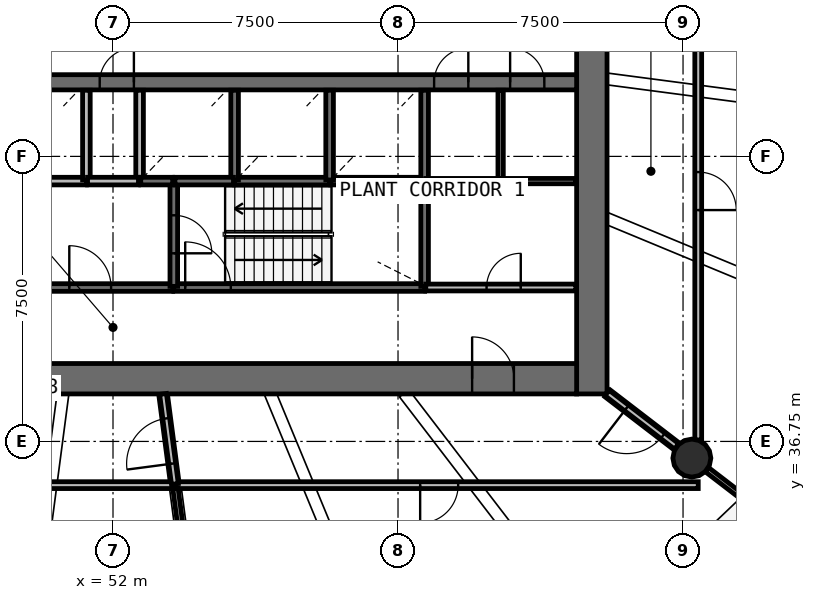
"""IFC4 building model, lengths in metres.
Left out: names, types, materials, properties, quantities, classifications, styles, units other than length and angle.
Written with IfcOpenShell. Run it as: python <this file> out.ifc"""

import sys

from ifc_helpers import new_model, si_unit, direction, frame, frame_2d, origin, origin_2d, place, context, subcontext, project, spatial, rectangle, circle, extrude, source, transform, mapped, element, fill, save


model = new_model("IFC4")
c1 = context("Model", 3, precision=1e-05, world=origin(), true_north=direction((0.0, 1.0)))
c2 = subcontext(c1, "Body", "Model", "MODEL_VIEW")
j1 = project(units=[si_unit("LENGTHUNIT", "METRE"), si_unit("PLANEANGLEUNIT", "RADIAN")], contexts=[c1])
p1 = place(None, origin())
s1 = spatial("IfcSite", under=j1, at=p1, CompositionType="ELEMENT")
p2 = place(p1, origin())
s2 = spatial("IfcBuilding", under=s1, at=p2, CompositionType="ELEMENT")
p3 = place(p2, frame((0.0, 0.0, 129.0)))
s3 = spatial("IfcBuildingStorey", under=s2, at=p3, CompositionType="ELEMENT", Elevation=129.0)
p4 = place(p3, frame((64.6, 38.0, 0.0), z_axis=(0.0, 0.0, 1.0), x_axis=(0.0, 1.0, 0.0)))
e1 = element("IfcWall", 1, at=p4, inside=s3, PredefinedType="SHEAR", context=c2, shape_type="SweptSolid", body=[
    extrude(rectangle(XDim=20.0, YDim=0.8, at=frame_2d((10.0, 0.0))), origin(), (0.0, 0.0, 1.0), 4.1),
])
p5 = place(p4, frame((9.1, 0.0, 0.0)))
e2 = element("IfcOpeningElement", 2, at=p5, cuts=e1, PredefinedType="OPENING", context=c2, shape_type="SweptSolid", body=[
    extrude(rectangle(XDim=1.8, YDim=2.1, at=frame_2d((0.9, 1.05))), frame((0.0, 0.41, 0.0), z_axis=(0.0, -1.0, 0.0), x_axis=(1.0, 0.0, 0.0)), (0.0, 0.0, 1.0), 0.82),
])
p6 = place(p3, frame((39.8, 38.4, 0.0), z_axis=(0.0, 0.0, 1.0), x_axis=(1.0, 0.0, 0.0)))
e3 = element("IfcWall", 3, at=p6, inside=s3, PredefinedType="SHEAR", context=c2, shape_type="SweptSolid", body=[
    extrude(rectangle(XDim=24.4, YDim=0.8, at=frame_2d((12.2, 0.0))), origin(), (0.0, 0.0, 1.0), 4.1),
])
p7 = place(p6, frame((21.65, 0.0, 0.0)))
e4 = element("IfcOpeningElement", 4, at=p7, cuts=e3, PredefinedType="OPENING", context=c2, shape_type="SweptSolid", body=[
    extrude(rectangle(XDim=1.1, YDim=2.1, at=frame_2d((0.55, 1.05))), frame((0.0, 0.41, 0.0), z_axis=(0.0, -1.0, 0.0), x_axis=(1.0, 0.0, 0.0)), (0.0, 0.0, 1.0), 0.82),
])
p8 = place(p6, frame((2.15, 0.0, 0.0)))
e5 = element("IfcOpeningElement", 5, at=p8, cuts=e3, PredefinedType="OPENING", context=c2, shape_type="SweptSolid", body=[
    extrude(rectangle(XDim=1.1, YDim=2.1, at=frame_2d((0.55, 1.05))), frame((0.0, 0.41, 0.0), z_axis=(0.0, -1.0, 0.0), x_axis=(1.0, 0.0, 0.0)), (0.0, 0.0, 1.0), 0.82),
])
p9 = place(p3, frame((39.8, 46.2, 0.0), z_axis=(0.0, 0.0, 1.0), x_axis=(1.0, 0.0, 0.0)))
e6 = element("IfcWall", 6, at=p9, inside=s3, PredefinedType="SHEAR", context=c2, shape_type="SweptSolid", body=[
    extrude(rectangle(XDim=24.4, YDim=0.4, at=frame_2d((12.2, 0.0))), origin(), (0.0, 0.0, 1.0), 4.1),
])
p10 = place(p9, frame((20.65, 0.0, 0.0)))
e7 = element("IfcOpeningElement", 7, at=p10, cuts=e6, PredefinedType="OPENING", context=c2, shape_type="SweptSolid", body=[
    extrude(rectangle(XDim=0.9, YDim=2.1, at=frame_2d((0.45, 1.05))), frame((0.0, 0.21, 0.0), z_axis=(0.0, -1.0, 0.0), x_axis=(1.0, 0.0, 0.0)), (0.0, 0.0, 1.0), 0.42),
])
p11 = place(p9, frame((22.65, 0.0, 0.0)))
e8 = element("IfcOpeningElement", 8, at=p11, cuts=e6, PredefinedType="OPENING", context=c2, shape_type="SweptSolid", body=[
    extrude(rectangle(XDim=0.9, YDim=2.1, at=frame_2d((0.45, 1.05))), frame((0.0, 0.21, 0.0), z_axis=(0.0, -1.0, 0.0), x_axis=(1.0, 0.0, 0.0)), (0.0, 0.0, 1.0), 0.42),
])
p12 = place(p9, frame((0.85, 0.0, 0.0)))
e9 = element("IfcOpeningElement", 9, at=p12, cuts=e6, PredefinedType="OPENING", context=c2, shape_type="SweptSolid", body=[
    extrude(rectangle(XDim=0.9, YDim=2.1, at=frame_2d((0.45, 1.05))), frame((0.0, 0.21, 0.0), z_axis=(0.0, -1.0, 0.0), x_axis=(1.0, 0.0, 0.0)), (0.0, 0.0, 1.0), 0.42),
])
p13 = place(p9, frame((2.85, 0.0, 0.0)))
e10 = element("IfcOpeningElement", 10, at=p13, cuts=e6, PredefinedType="OPENING", context=c2, shape_type="SweptSolid", body=[
    extrude(rectangle(XDim=0.9, YDim=2.1, at=frame_2d((0.45, 1.05))), frame((0.0, 0.21, 0.0), z_axis=(0.0, -1.0, 0.0), x_axis=(1.0, 0.0, 0.0)), (0.0, 0.0, 1.0), 0.42),
])
p14 = place(p9, frame((11.85, 0.0, 0.0)))
e11 = element("IfcOpeningElement", 11, at=p14, cuts=e6, PredefinedType="OPENING", context=c2, shape_type="SweptSolid", body=[
    extrude(rectangle(XDim=0.9, YDim=2.1, at=frame_2d((0.45, 1.05))), frame((0.0, 0.21, 0.0), z_axis=(0.0, -1.0, 0.0), x_axis=(1.0, 0.0, 0.0)), (0.0, 0.0, 1.0), 0.42),
])
m1 = source(origin(), c2, "Body", "SweptSolid", [
    extrude(circle(Radius=0.5, at=origin_2d()), origin(), (0.0, 0.0, 1.0), 3.78),
])
p15 = place(p3, frame((67.232, 36.312, 0.0), z_axis=(0.0, 0.0, 1.0), x_axis=(1.0, 0.0, 0.0)))
e12 = element("IfcColumn", 12, at=p15, inside=s3, PredefinedType="COLUMN", context=c2, shape_type="MappedRepresentation", body=[
    mapped(m1, transform((0.0, 0.0, 0.0), scale=1.0)),
])
p16 = place(p3, frame((53.6, 40.8, 0.0), z_axis=(0.0, 0.0, 1.0), x_axis=(1.0, 0.0, 0.0)))
e13 = element("IfcWall", 13, at=p16, inside=s3, PredefinedType="SOLIDWALL", context=c2, shape_type="SweptSolid", body=[
    extrude(rectangle(XDim=6.6, YDim=0.2, at=frame_2d((3.3, 0.0))), origin(), (0.0, 0.0, 1.0), 3.78),
])
p17 = place(p16, frame((0.3, 0.0, 0.0)))
e14 = element("IfcOpeningElement", 14, at=p17, cuts=e13, PredefinedType="OPENING", context=c2, shape_type="SweptSolid", body=[
    extrude(rectangle(XDim=1.2, YDim=2.1, at=frame_2d((0.6, 1.05))), frame((0.0, 0.11, 0.0), z_axis=(0.0, -1.0, 0.0), x_axis=(1.0, 0.0, 0.0)), (0.0, 0.0, 1.0), 0.22),
])
p18 = place(p3, frame((47.9, 40.8, 0.0), z_axis=(0.0, 0.0, 1.0), x_axis=(1.0, 0.0, 0.0)))
e15 = element("IfcWall", 15, at=p18, inside=s3, PredefinedType="SOLIDWALL", context=c2, shape_type="SweptSolid", body=[
    extrude(rectangle(XDim=5.67, YDim=0.2, at=frame_2d((2.835, 0.0))), origin(), (0.0, 0.0, 1.0), 3.78),
])
p19 = place(p18, frame((2.95, 0.0, 0.0)))
e16 = element("IfcOpeningElement", 16, at=p19, cuts=e15, PredefinedType="OPENING", context=c2, shape_type="SweptSolid", body=[
    extrude(rectangle(XDim=1.1, YDim=2.1, at=frame_2d((0.55, 1.05))), frame((0.0, 0.11, 0.0), z_axis=(0.0, -1.0, 0.0), x_axis=(1.0, 0.0, 0.0)), (0.0, 0.0, 1.0), 0.22),
])
p20 = place(p3, frame((60.2, 40.83, 0.0), z_axis=(0.0, 0.0, 1.0), x_axis=(0.0, 1.0, 0.0)))
e17 = element("IfcWall", 17, at=p20, inside=s3, PredefinedType="SOLIDWALL", context=c2, shape_type="SweptSolid", body=[
    extrude(rectangle(XDim=2.77, YDim=0.2, at=frame_2d((1.385, 0.0))), origin(), (0.0, 0.0, 1.0), 3.78),
])
p21 = place(p3, frame((53.6, 43.6, 0.0), z_axis=(0.0, 0.0, 1.0), x_axis=(0.0, -1.0, 0.0)))
e18 = element("IfcWall", 18, at=p21, inside=s3, PredefinedType="SOLIDWALL", context=c2, shape_type="SweptSolid", body=[
    extrude(rectangle(XDim=2.77, YDim=0.2, at=frame_2d((1.385, 0.0))), origin(), (0.0, 0.0, 1.0), 3.78),
])
p22 = place(p21, frame((0.9, 0.0, 0.0)))
e19 = element("IfcOpeningElement", 19, at=p22, cuts=e18, PredefinedType="OPENING", context=c2, shape_type="SweptSolid", body=[
    extrude(rectangle(XDim=1.0, YDim=2.1, at=frame_2d((0.5, 1.05))), frame((0.0, 0.11, 0.0), z_axis=(0.0, -1.0, 0.0), x_axis=(1.0, 0.0, 0.0)), (0.0, 0.0, 1.0), 0.22),
])
for number, where, z_axis, x_axis in (
    (20, (48.8, 43.6, 0.0), (0.0, 0.0, 1.0), (1.0, 0.0, 0.0)),
    (21, (55.2, 43.6, 0.0), (0.0, 0.0, 1.0), (1.0, 0.0, 0.0)),
):
    element("IfcWall", number, at=place(p3, frame(where, z_axis=z_axis, x_axis=x_axis)), inside=s3, PredefinedType="SOLIDWALL", context=c2, shape_type="SweptSolid", body=[
        extrude(rectangle(XDim=2.5, YDim=0.2, at=frame_2d((1.25, 0.0))), origin(), (0.0, 0.0, 1.0), 3.78),
    ])
p23 = place(p3, frame((57.73, 43.6, 0.0), z_axis=(0.0, 0.0, 1.0), x_axis=(1.0, 0.0, 0.0)))
e22 = element("IfcWall", 22, at=p23, inside=s3, PredefinedType="SOLIDWALL", context=c2, shape_type="SweptSolid", body=[
    extrude(rectangle(XDim=2.44, YDim=0.2, at=frame_2d((1.22, 0.0))), origin(), (0.0, 0.0, 1.0), 3.78),
])
p24 = place(p3, frame((51.3, 43.63, 0.0), z_axis=(0.0, 0.0, 1.0), x_axis=(0.0, 1.0, 0.0)))
e23 = element("IfcWall", 23, at=p24, inside=s3, PredefinedType="SOLIDWALL", context=c2, shape_type="SweptSolid", body=[
    extrude(rectangle(XDim=2.36, YDim=0.2, at=frame_2d((1.18, 0.0))), origin(), (0.0, 0.0, 1.0), 3.78),
])
p25 = place(p3, frame((52.7, 45.99, 0.0), z_axis=(0.0, 0.0, 1.0), x_axis=(0.0, -1.0, 0.0)))
e24 = element("IfcWall", 24, at=p25, inside=s3, PredefinedType="SOLIDWALL", context=c2, shape_type="SweptSolid", body=[
    extrude(rectangle(XDim=2.39, YDim=0.2, at=frame_2d((1.195, 0.0))), origin(), (0.0, 0.0, 1.0), 3.78),
])
for number, where, z_axis, x_axis in (
    (25, (55.2, 43.63, 0.0), (0.0, 0.0, 1.0), (0.0, 1.0, 0.0)),
    (26, (57.7, 43.63, 0.0), (0.0, 0.0, 1.0), (0.0, 1.0, 0.0)),
    (27, (60.2, 43.63, 0.0), (0.0, 0.0, 1.0), (0.0, 1.0, 0.0)),
):
    element("IfcWall", number, at=place(p3, frame(where, z_axis=z_axis, x_axis=x_axis)), inside=s3, PredefinedType="SOLIDWALL", context=c2, shape_type="SweptSolid", body=[
        extrude(rectangle(XDim=2.36, YDim=0.2, at=frame_2d((1.18, 0.0))), origin(), (0.0, 0.0, 1.0), 3.78),
    ])
p26 = place(p3, frame((53.63, 43.6, 0.0), z_axis=(0.0, 0.0, 1.0), x_axis=(1.0, 0.0, 0.0)))
e28 = element("IfcWall", 28, at=p26, inside=s3, PredefinedType="SOLIDWALL", context=c2, shape_type="SweptSolid", body=[
    extrude(rectangle(XDim=1.54, YDim=0.2, at=frame_2d((0.77, 0.0))), origin(), (0.0, 0.0, 1.0), 3.78),
])
p27 = place(p3, frame((52.67, 43.6, 0.0), z_axis=(0.0, 0.0, 1.0), x_axis=(-1.0, 0.0, 0.0)))
e29 = element("IfcWall", 29, at=p27, inside=s3, PredefinedType="SOLIDWALL", context=c2, shape_type="SweptSolid", body=[
    extrude(rectangle(XDim=1.34, YDim=0.2, at=frame_2d((0.67, 0.0))), origin(), (0.0, 0.0, 1.0), 3.78),
])
p28 = place(p3, frame((52.73, 43.6, 0.0), z_axis=(0.0, 0.0, 1.0), x_axis=(1.0, 0.0, 0.0)))
e30 = element("IfcWall", 30, at=p28, inside=s3, PredefinedType="SOLIDWALL", context=c2, shape_type="SweptSolid", body=[
    extrude(rectangle(XDim=0.84, YDim=0.2, at=frame_2d((0.42, 0.0))), origin(), (0.0, 0.0, 1.0), 3.78),
])
p29 = place(p3, frame((67.4, 35.6, 0.0), z_axis=(0.0, 0.0, 1.0), x_axis=(-1.0, 0.0, 0.0)))
e31 = element("IfcWall", 31, at=p29, inside=s3, PredefinedType="PARTITIONING", context=c2, shape_type="SweptSolid", body=[
    extrude(rectangle(XDim=13.767, YDim=0.18, at=frame_2d((6.884, 0.0))), origin(), (0.0, 0.0, 1.0), 2.58),
])
p30 = place(p29, frame((6.317, 0.0, 0.0)))
e32 = element("IfcOpeningElement", 32, at=p30, cuts=e31, PredefinedType="OPENING", context=c2, shape_type="SweptSolid", body=[
    extrude(rectangle(XDim=1.0, YDim=2.1, at=frame_2d((0.5, 1.05))), frame((0.0, 0.1, 0.0), z_axis=(0.0, -1.0, 0.0), x_axis=(1.0, 0.0, 0.0)), (0.0, 0.0, 1.0), 0.2),
])
p31 = place(p3, frame((67.4, 50.027, 0.0), z_axis=(0.0, 0.0, 1.0), x_axis=(0.0, -1.0, 0.0)))
e33 = element("IfcWall", 33, at=p31, inside=s3, PredefinedType="PARTITIONING", context=c2, shape_type="SweptSolid", body=[
    extrude(rectangle(XDim=13.24, YDim=0.18, at=frame_2d((6.62, 0.0))), origin(), (0.0, 0.0, 1.0), 2.58),
])
p32 = place(p31, frame((6.19, 0.0, 0.0)))
e34 = element("IfcOpeningElement", 34, at=p32, cuts=e33, PredefinedType="OPENING", context=c2, shape_type="SweptSolid", body=[
    extrude(rectangle(XDim=1.0, YDim=2.1, at=frame_2d((0.5, 1.05))), frame((0.0, 0.1, 0.0), z_axis=(0.0, -1.0, 0.0), x_axis=(1.0, 0.0, 0.0)), (0.0, 0.0, 1.0), 0.2),
])
p33 = place(p3, frame((53.603, 35.6, 0.0), z_axis=(0.0, 0.0, 1.0), x_axis=(-1.0, 0.0, 0.0)))
e35 = element("IfcWall", 35, at=p33, inside=s3, PredefinedType="PARTITIONING", context=c2, shape_type="SweptSolid", body=[
    extrude(rectangle(XDim=11.117, YDim=0.18, at=frame_2d((5.559, 0.0))), origin(), (0.0, 0.0, 1.0), 2.58),
])
p34 = place(p33, frame((5.067, 0.0, 0.0)))
e36 = element("IfcOpeningElement", 36, at=p34, cuts=e35, PredefinedType="OPENING", context=c2, shape_type="SweptSolid", body=[
    extrude(rectangle(XDim=1.0, YDim=2.1, at=frame_2d((0.5, 1.05))), frame((0.0, 0.1, 0.0), z_axis=(0.0, -1.0, 0.0), x_axis=(1.0, 0.0, 0.0)), (0.0, 0.0, 1.0), 0.2),
])
p35 = place(p3, frame((60.23, 40.8, 0.0), z_axis=(0.0, 0.0, 1.0), x_axis=(1.0, 0.0, 0.0)))
e37 = element("IfcWall", 37, at=p35, inside=s3, PredefinedType="PARTITIONING", context=c2, shape_type="SweptSolid", body=[
    extrude(rectangle(XDim=3.95, YDim=0.18, at=frame_2d((1.975, 0.0))), origin(), (0.0, 0.0, 1.0), 3.78),
])
p36 = place(p35, frame((1.6, 0.0, 0.0)))
e38 = element("IfcOpeningElement", 38, at=p36, cuts=e37, PredefinedType="OPENING", context=c2, shape_type="SweptSolid", body=[
    extrude(rectangle(XDim=0.9, YDim=2.1, at=frame_2d((0.45, 1.05))), frame((0.0, 0.1, 0.0), z_axis=(0.0, -1.0, 0.0), x_axis=(1.0, 0.0, 0.0)), (0.0, 0.0, 1.0), 0.2),
])
p37 = place(p3, frame((53.629, 35.63, 0.0), z_axis=(0.0, 0.0, 1.0), x_axis=(-0.13060507681, 0.991434472828, 0.0)))
e39 = element("IfcWall", 39, at=p37, inside=s3, PredefinedType="PARTITIONING", context=c2, shape_type="SweptSolid", body=[
    extrude(rectangle(XDim=2.391, YDim=0.18, at=frame_2d((1.195, 0.0))), origin(), (0.0, 0.0, 1.0), 2.58),
])
p38 = place(p37, frame((0.541, 0.0, 0.0)))
e40 = element("IfcOpeningElement", 40, at=p38, cuts=e39, PredefinedType="OPENING", context=c2, shape_type="SweptSolid", body=[
    extrude(rectangle(XDim=1.2, YDim=2.1, at=frame_2d((0.6, 1.05))), frame((0.0, 0.1, 0.0), z_axis=(0.0, -1.0, 0.0), x_axis=(1.0, 0.0, 0.0)), (0.0, 0.0, 1.0), 0.2),
])
p39 = place(p3, frame((66.832, 36.619, 0.0), z_axis=(0.0, 0.0, 1.0), x_axis=(-0.793393624489, 0.608708926023, 0.0)))
e41 = element("IfcWall", 41, at=p39, inside=s3, PredefinedType="PARTITIONING", context=c2, shape_type="SweptSolid", body=[
    extrude(rectangle(XDim=2.309, YDim=0.18, at=frame_2d((1.155, 0.0))), origin(), (0.0, 0.0, 1.0), 2.58),
])
p40 = place(p39, frame((0.459, 0.0, 0.0)))
e42 = element("IfcOpeningElement", 42, at=p40, cuts=e41, PredefinedType="OPENING", context=c2, shape_type="SweptSolid", body=[
    extrude(rectangle(XDim=1.2, YDim=2.1, at=frame_2d((0.6, 1.05))), frame((0.0, 0.1, 0.0), z_axis=(0.0, -1.0, 0.0), x_axis=(1.0, 0.0, 0.0)), (0.0, 0.0, 1.0), 0.2),
])
p41 = place(p3, frame((62.2, 43.6, 0.0), z_axis=(0.0, 0.0, 1.0), x_axis=(0.0, 1.0, 0.0)))
e43 = element("IfcWall", 43, at=p41, inside=s3, PredefinedType="PARTITIONING", context=c2, shape_type="SweptSolid", body=[
    extrude(rectangle(XDim=2.39, YDim=0.14, at=frame_2d((1.195, 0.0))), origin(), (0.0, 0.0, 1.0), 2.98),
])
p42 = place(p3, frame((53.644, 35.51, 0.0), z_axis=(0.0, 0.0, 1.0), x_axis=(0.130498135038, -0.991448554768, 0.0)))
e44 = element("IfcWall", 44, at=p42, inside=s3, PredefinedType="PARTITIONING", context=c2, shape_type="SweptSolid", body=[
    extrude(rectangle(XDim=1.882, YDim=0.14, at=frame_2d((0.941, 0.0))), origin(), (0.0, 0.0, 1.0), 2.58),
])
p43 = place(p3, frame((60.23, 43.6, 0.0), z_axis=(0.0, 0.0, 1.0), x_axis=(1.0, 0.0, 0.0)))
e45 = element("IfcWall", 45, at=p43, inside=s3, PredefinedType="PARTITIONING", context=c2, shape_type="SweptSolid", body=[
    extrude(rectangle(XDim=1.94, YDim=0.14, at=frame_2d((0.97, 0.0))), origin(), (0.0, 0.0, 1.0), 2.98),
])
p44 = place(p3, frame((62.23, 43.6, 0.0), z_axis=(0.0, 0.0, 1.0), x_axis=(1.0, 0.0, 0.0)))
e46 = element("IfcWall", 46, at=p44, inside=s3, PredefinedType="PARTITIONING", context=c2, shape_type="SweptSolid", body=[
    extrude(rectangle(XDim=1.95, YDim=0.14, at=frame_2d((0.975, 0.0))), origin(), (0.0, 0.0, 1.0), 2.98),
])
p45 = place(p3, frame((67.633, 36.005, 0.0), z_axis=(0.0, 0.0, 1.0), x_axis=(0.793448671778, -0.60863717045, 0.0)))
e47 = element("IfcWall", 47, at=p45, inside=s3, PredefinedType="PARTITIONING", context=c2, shape_type="SweptSolid", body=[
    extrude(rectangle(XDim=1.122, YDim=0.14, at=frame_2d((0.561, 0.0))), origin(), (0.0, 0.0, 1.0), 2.58),
])
m2 = source(origin(), c2, "Body", "SweptSolid", [
    extrude(rectangle(XDim=1.2, YDim=2.1, at=frame_2d((0.6, 1.05))), frame((0.0, 0.025, 0.0), z_axis=(0.0, -1.0, 0.0), x_axis=(1.0, 0.0, 0.0)), (0.0, 0.0, 1.0), 0.05),
])
p46 = place(p17, origin())
e48 = element("IfcDoor", 48, at=p46, inside=s3, OperationType="SINGLE_SWING_LEFT", PredefinedType="DOOR", context=c2, shape_type="MappedRepresentation", body=[
    mapped(m2, transform((0.0, 0.0, 0.0), scale=1.0)),
])
fill(e14, e48)
m3 = source(origin(), c2, "Body", "SweptSolid", [
    extrude(rectangle(XDim=1.0, YDim=2.1, at=frame_2d((0.5, 1.05))), frame((0.0, 0.025, 0.0), z_axis=(0.0, -1.0, 0.0), x_axis=(1.0, 0.0, 0.0)), (0.0, 0.0, 1.0), 0.05),
])
p47 = place(p22, origin())
e49 = element("IfcDoor", 49, at=p47, inside=s3, OperationType="SINGLE_SWING_RIGHT", PredefinedType="DOOR", context=c2, shape_type="MappedRepresentation", body=[
    mapped(m3, transform((0.0, 0.0, 0.0), scale=1.0)),
])
fill(e19, e49)
m4 = source(origin(), c2, "Body", "SweptSolid", [
    extrude(rectangle(XDim=1.1, YDim=2.1, at=frame_2d((0.55, 1.05))), frame((0.0, 0.025, 0.0), z_axis=(0.0, -1.0, 0.0), x_axis=(1.0, 0.0, 0.0)), (0.0, 0.0, 1.0), 0.05),
])
p48 = place(p19, origin())
e50 = element("IfcDoor", 50, at=p48, inside=s3, OperationType="SINGLE_SWING_LEFT", PredefinedType="DOOR", context=c2, shape_type="MappedRepresentation", body=[
    mapped(m4, transform((0.0, 0.0, 0.0), scale=1.0)),
])
fill(e16, e50)
m5 = source(origin(), c2, "Body", "SweptSolid", [
    extrude(rectangle(XDim=1.1, YDim=2.1, at=frame_2d((0.55, 1.05))), frame((0.0, 0.025, 0.0), z_axis=(0.0, -1.0, 0.0), x_axis=(1.0, 0.0, 0.0)), (0.0, 0.0, 1.0), 0.05),
])
p49 = place(p7, origin())
e51 = element("IfcDoor", 51, at=p49, inside=s3, OperationType="SINGLE_SWING_LEFT", PredefinedType="DOOR", context=c2, shape_type="MappedRepresentation", body=[
    mapped(m5, transform((0.0, 0.0, 0.0), scale=1.0)),
])
fill(e4, e51)
m6 = source(origin(), c2, "Body", "SweptSolid", [
    extrude(rectangle(XDim=1.0, YDim=2.1, at=frame_2d((0.5, 1.05))), frame((0.0, 0.025, 0.0), z_axis=(0.0, -1.0, 0.0), x_axis=(1.0, 0.0, 0.0)), (0.0, 0.0, 1.0), 0.05),
])
p50 = place(p30, origin())
e52 = element("IfcDoor", 52, at=p50, inside=s3, OperationType="SINGLE_SWING_RIGHT", PredefinedType="DOOR", context=c2, shape_type="MappedRepresentation", body=[
    mapped(m6, transform((0.0, 0.0, 0.0), scale=1.0)),
])
fill(e32, e52)
p51 = place(p32, origin())
e53 = element("IfcDoor", 53, at=p51, inside=s3, OperationType="SINGLE_SWING_RIGHT", PredefinedType="DOOR", context=c2, shape_type="MappedRepresentation", body=[
    mapped(m6, transform((0.0, 0.0, 0.0), scale=1.0)),
])
fill(e34, e53)
m7 = source(origin(), c2, "Body", "SweptSolid", [
    extrude(rectangle(XDim=1.2, YDim=2.1, at=frame_2d((0.6, 1.05))), frame((0.0, 0.025, 0.0), z_axis=(0.0, -1.0, 0.0), x_axis=(1.0, 0.0, 0.0)), (0.0, 0.0, 1.0), 0.05),
])
p52 = place(p38, origin())
e54 = element("IfcDoor", 54, at=p52, inside=s3, OperationType="SINGLE_SWING_LEFT", PredefinedType="DOOR", context=c2, shape_type="MappedRepresentation", body=[
    mapped(m7, transform((0.0, 0.0, 0.0), scale=1.0)),
])
fill(e40, e54)
p53 = place(p40, origin())
e55 = element("IfcDoor", 55, at=p53, inside=s3, OperationType="SINGLE_SWING_RIGHT", PredefinedType="DOOR", context=c2, shape_type="MappedRepresentation", body=[
    mapped(m7, transform((0.0, 0.0, 0.0), scale=1.0)),
])
fill(e42, e55)
m8 = source(origin(), c2, "Body", "SweptSolid", [
    extrude(rectangle(XDim=0.9, YDim=2.1, at=frame_2d((0.45, 1.05))), frame((0.0, 0.025, 0.0), z_axis=(0.0, -1.0, 0.0), x_axis=(1.0, 0.0, 0.0)), (0.0, 0.0, 1.0), 0.05),
])
p54 = place(p10, origin())
e56 = element("IfcDoor", 56, at=p54, inside=s3, OperationType="SINGLE_SWING_RIGHT", PredefinedType="DOOR", context=c2, shape_type="MappedRepresentation", body=[
    mapped(m8, transform((0.0, 0.0, 0.0), scale=1.0)),
])
fill(e7, e56)
p55 = place(p11, origin())
e57 = element("IfcDoor", 57, at=p55, inside=s3, OperationType="SINGLE_SWING_LEFT", PredefinedType="DOOR", context=c2, shape_type="MappedRepresentation", body=[
    mapped(m8, transform((0.0, 0.0, 0.0), scale=1.0)),
])
fill(e8, e57)
p56 = place(p36, origin())
e58 = element("IfcDoor", 58, at=p56, inside=s3, OperationType="SINGLE_SWING_RIGHT", PredefinedType="DOOR", context=c2, shape_type="MappedRepresentation", body=[
    mapped(m8, transform((0.0, 0.0, 0.0), scale=1.0)),
])
fill(e38, e58)
p57 = place(p14, origin())
e59 = element("IfcDoor", 59, at=p57, inside=s3, OperationType="SINGLE_SWING_RIGHT", PredefinedType="DOOR", context=c2, shape_type="MappedRepresentation", body=[
    mapped(m8, transform((0.0, 0.0, 0.0), scale=1.0)),
])
fill(e11, e59)
save(model, sys.argv[1])
